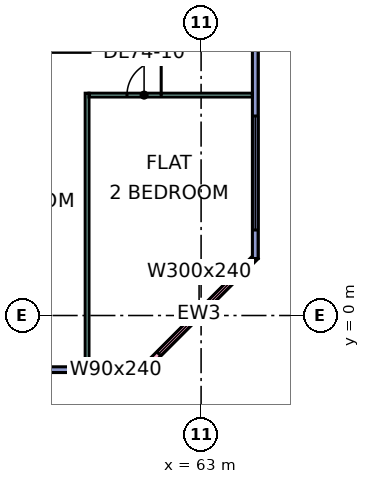
"""IFC4 building model, lengths in metres.
Left out: names, types, materials, properties, quantities, classifications, styles, units other than length and angle.
Written with IfcOpenShell. Run it as: python <this file> out.ifc"""

import sys

from ifc_helpers import new_model, si_unit, direction, frame, frame_2d, origin, place, context, subcontext, project, spatial, rectangle, extrude, element, fill, save


model = new_model("IFC4")
c1 = context("Model", 3, precision=1e-05, world=origin(), true_north=direction((0.0, 1.0)))
c2 = subcontext(c1, "Body", "Model", "MODEL_VIEW")
j1 = project(units=[si_unit("LENGTHUNIT", "METRE"), si_unit("PLANEANGLEUNIT", "RADIAN")], contexts=[c1])
p1 = place(None, origin())
s1 = spatial("IfcSite", under=j1, at=p1, CompositionType="ELEMENT")
p2 = place(p1, origin())
s2 = spatial("IfcBuilding", under=s1, at=p2, CompositionType="ELEMENT")
p3 = place(p2, frame((0.0, 0.0, 314.65)))
s3 = spatial("IfcBuildingStorey", under=s2, at=p3, CompositionType="ELEMENT", Elevation=314.65)
p4 = place(p3, frame((48.075, -1.425, 0.0), z_axis=(0.0, 0.0, 1.0), x_axis=(1.0, 0.0, 0.0)))
e1 = element("IfcWall", 1, at=p4, inside=s3, PredefinedType="SOLIDWALL", context=c2, shape_type="SweptSolid", body=[
    extrude(rectangle(XDim=13.425, YDim=0.15, at=frame_2d((6.712, 0.0))), origin(), (0.0, 0.0, 1.0), 3.35),
])
p5 = place(p4, frame((0.562, 0.0, 0.45)))
e2 = element("IfcOpeningElement", 2, at=p5, cuts=e1, PredefinedType="OPENING", context=c2, shape_type="SweptSolid", body=[
    extrude(rectangle(XDim=1.8, YDim=2.4, at=frame_2d((0.9, 1.2))), frame((0.0, 0.085, 0.0), z_axis=(0.0, -1.0, 0.0), x_axis=(1.0, 0.0, 0.0)), (0.0, 0.0, 1.0), 0.17),
])
p6 = place(p4, frame((3.525, 0.0, 0.45)))
e3 = element("IfcOpeningElement", 3, at=p6, cuts=e1, PredefinedType="OPENING", context=c2, shape_type="SweptSolid", body=[
    extrude(rectangle(XDim=1.8, YDim=2.4, at=frame_2d((0.9, 1.2))), frame((0.0, 0.085, 0.0), z_axis=(0.0, -1.0, 0.0), x_axis=(1.0, 0.0, 0.0)), (0.0, 0.0, 1.0), 0.17),
])
p7 = place(p4, frame((7.425, 0.0, 0.45)))
e4 = element("IfcOpeningElement", 4, at=p7, cuts=e1, PredefinedType="OPENING", context=c2, shape_type="SweptSolid", body=[
    extrude(rectangle(XDim=3.0, YDim=2.4, at=frame_2d((1.5, 1.2))), frame((0.0, 0.085, 0.0), z_axis=(0.0, -1.0, 0.0), x_axis=(1.0, 0.0, 0.0)), (0.0, 0.0, 1.0), 0.17),
])
p8 = place(p4, frame((12.225, 0.0, 0.45)))
e5 = element("IfcOpeningElement", 5, at=p8, cuts=e1, PredefinedType="OPENING", context=c2, shape_type="SweptSolid", body=[
    extrude(rectangle(XDim=0.9, YDim=2.4, at=frame_2d((0.45, 1.2))), frame((0.0, 0.085, 0.0), z_axis=(0.0, -1.0, 0.0), x_axis=(1.0, 0.0, 0.0)), (0.0, 0.0, 1.0), 0.17),
])
p9 = place(p3, frame((61.447, -1.447, 0.0), z_axis=(0.0, 0.0, 1.0), x_axis=(0.707106781187, 0.707106781187, 0.0)))
e6 = element("IfcWall", 6, at=p9, inside=s3, PredefinedType="SOLIDWALL", context=c2, shape_type="SweptSolid", body=[
    extrude(rectangle(XDim=4.243, YDim=0.15, at=frame_2d((2.121, 0.0))), origin(), (0.0, 0.0, 1.0), 3.35),
])
p10 = place(p9, frame((0.621, 0.0, 0.45)))
e7 = element("IfcOpeningElement", 7, at=p10, cuts=e6, PredefinedType="OPENING", context=c2, shape_type="SweptSolid", body=[
    extrude(rectangle(XDim=3.0, YDim=2.4, at=frame_2d((1.5, 1.2))), frame((0.0, 0.085, 0.0), z_axis=(0.0, -1.0, 0.0), x_axis=(1.0, 0.0, 0.0)), (0.0, 0.0, 1.0), 0.17),
])
p11 = place(p3, frame((64.425, 1.5, 0.0), z_axis=(0.0, 0.0, 1.0), x_axis=(0.0, 1.0, 0.0)))
e8 = element("IfcWall", 8, at=p11, inside=s3, PredefinedType="SOLIDWALL", context=c2, shape_type="SweptSolid", body=[
    extrude(rectangle(XDim=10.425, YDim=0.15, at=frame_2d((5.212, 0.0))), origin(), (0.0, 0.0, 1.0), 3.35),
])
p12 = place(p11, frame((0.75, 0.0, 0.45)))
e9 = element("IfcOpeningElement", 9, at=p12, cuts=e8, PredefinedType="OPENING", context=c2, shape_type="SweptSolid", body=[
    extrude(rectangle(XDim=3.0, YDim=2.4, at=frame_2d((1.5, 1.2))), frame((0.0, 0.085, 0.0), z_axis=(0.0, -1.0, 0.0), x_axis=(1.0, 0.0, 0.0)), (0.0, 0.0, 1.0), 0.17),
])
p13 = place(p3, frame((60.0, -1.35, 0.0), z_axis=(0.0, 0.0, 1.0), x_axis=(0.0, 1.0, 0.0)))
e10 = element("IfcWall", 10, at=p13, inside=s3, PredefinedType="PARTITIONING", context=c2, shape_type="SweptSolid", body=[
    extrude(rectangle(XDim=7.2, YDim=0.1, at=frame_2d((3.6, 0.0))), origin(), (0.0, 0.0, 1.0), 3.35),
])
p14 = place(p3, frame((60.05, 5.8, 0.0), z_axis=(0.0, 0.0, 1.0), x_axis=(1.0, 0.0, 0.0)))
e11 = element("IfcWall", 11, at=p14, inside=s3, PredefinedType="PARTITIONING", context=c2, shape_type="SweptSolid", body=[
    extrude(rectangle(XDim=4.3, YDim=0.1, at=frame_2d((2.15, 0.0))), origin(), (0.0, 0.0, 1.0), 3.35),
])
p15 = place(p14, frame((1.0, 0.0, 0.0)))
e12 = element("IfcOpeningElement", 12, at=p15, cuts=e11, PredefinedType="OPENING", context=c2, shape_type="SweptSolid", body=[
    extrude(rectangle(XDim=0.9, YDim=2.1, at=frame_2d((0.45, 1.05))), frame((0.0, 0.06, 0.0), z_axis=(0.0, -1.0, 0.0), x_axis=(1.0, 0.0, 0.0)), (0.0, 0.0, 1.0), 0.12),
])
p16 = place(p8, origin())
e13 = element("IfcWindow", 13, at=p16, inside=s3, PartitioningType="SINGLE_PANEL", PredefinedType="WINDOW", context=c2, shape_type="SweptSolid", body=[
    extrude(rectangle(XDim=0.9, YDim=2.4, at=frame_2d((0.45, 1.2))), frame((0.0, 0.03, 0.0), z_axis=(0.0, -1.0, 0.0), x_axis=(1.0, 0.0, 0.0)), (0.0, 0.0, 1.0), 0.06),
])
fill(e5, e13)
p17 = place(p10, origin())
e14 = element("IfcWindow", 14, at=p17, inside=s3, PartitioningType="SINGLE_PANEL", PredefinedType="WINDOW", context=c2, shape_type="SweptSolid", body=[
    extrude(rectangle(XDim=3.0, YDim=2.4, at=frame_2d((1.5, 1.2))), frame((0.0, 0.03, 0.0), z_axis=(0.0, -1.0, 0.0), x_axis=(1.0, 0.0, 0.0)), (0.0, 0.0, 1.0), 0.06),
])
fill(e7, e14)
p18 = place(p12, origin())
e15 = element("IfcWindow", 15, at=p18, inside=s3, PartitioningType="SINGLE_PANEL", PredefinedType="WINDOW", context=c2, shape_type="SweptSolid", body=[
    extrude(rectangle(XDim=3.0, YDim=2.4, at=frame_2d((1.5, 1.2))), frame((0.0, 0.03, 0.0), z_axis=(0.0, -1.0, 0.0), x_axis=(1.0, 0.0, 0.0)), (0.0, 0.0, 1.0), 0.06),
])
fill(e9, e15)
p19 = place(p15, frame((0.9, 0.0, 0.0), z_axis=(0.0, 0.0, 1.0), x_axis=(-1.0, 0.0, 0.0)))
e16 = element("IfcDoor", 16, at=p19, inside=s3, OperationType="SINGLE_SWING_RIGHT", PredefinedType="DOOR", context=c2, shape_type="SweptSolid", body=[
    extrude(rectangle(XDim=0.9, YDim=2.1, at=frame_2d((0.45, 1.05))), frame((0.0, 0.025, 0.0), z_axis=(0.0, -1.0, 0.0), x_axis=(1.0, 0.0, 0.0)), (0.0, 0.0, 1.0), 0.05),
])
fill(e12, e16)
save(model, sys.argv[1])
